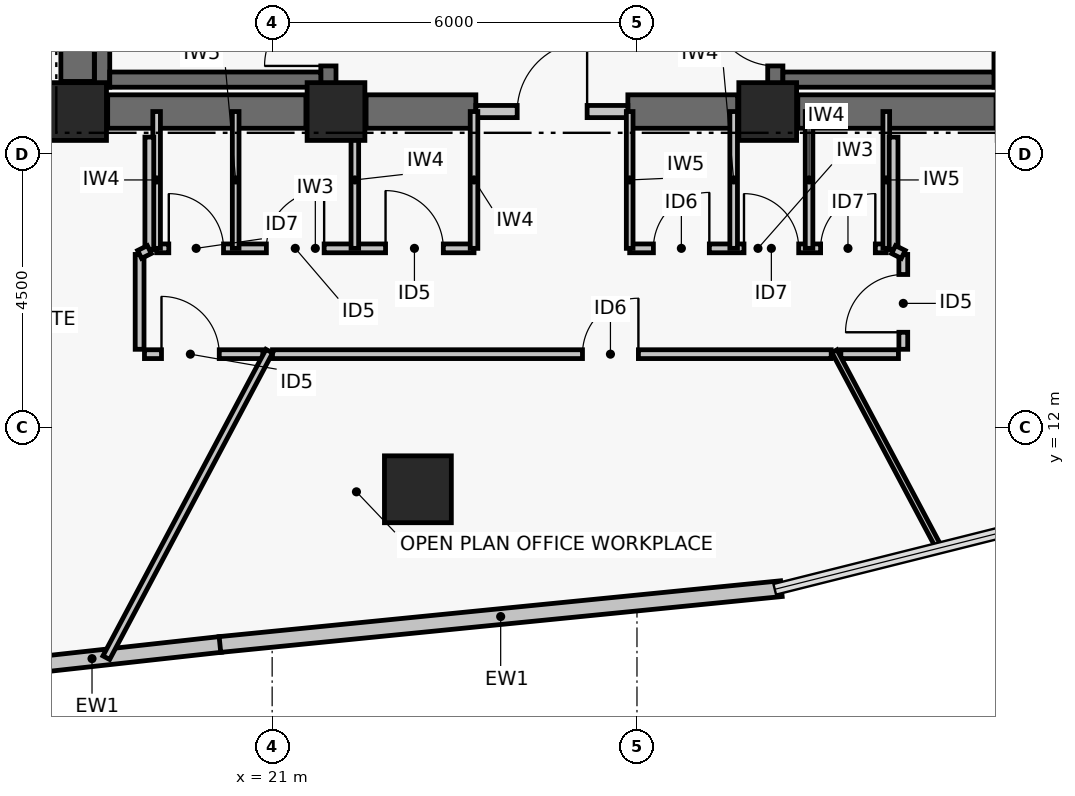
"""IFC4 building model, lengths in metres.
Left out: names, types, materials, properties, quantities, classifications, styles, units other than length and angle.
Written with IfcOpenShell. Run it as: python <this file> out.ifc"""

import sys

from ifc_helpers import new_model, si_unit, direction, frame, frame_2d, origin, origin_2d, place, context, subcontext, project, spatial, rectangle, hollow_rectangle, extrude, element, fill, save


model = new_model("IFC4")
c1 = context("Model", 3, precision=1e-05, world=origin(), true_north=direction((0.0, 1.0)))
c2 = subcontext(c1, "Body", "Model", "MODEL_VIEW")
j1 = project(units=[si_unit("LENGTHUNIT", "METRE"), si_unit("PLANEANGLEUNIT", "RADIAN")], contexts=[c1])
p1 = place(None, origin())
s1 = spatial("IfcSite", under=j1, at=p1, CompositionType="ELEMENT")
p2 = place(p1, origin())
s2 = spatial("IfcBuilding", under=s1, at=p2, CompositionType="ELEMENT")
p3 = place(p2, frame((0.0, 0.0, 165.48)))
s3 = spatial("IfcBuildingStorey", under=s2, at=p3, CompositionType="ELEMENT", Elevation=165.48)
for number, where, z_axis, x_axis in (
    (1, (17.8, 17.2, 0.0), (0.0, 0.0, 1.0), (1.0, 0.0, 0.0)),
    (2, (22.05, 17.2, 0.0), (0.0, 0.0, 1.0), (1.0, 0.0, 0.0)),
    (3, (29.15, 17.2, 0.0), (0.0, 0.0, 1.0), (1.0, 0.0, 0.0)),
):
    element("IfcColumn", number, at=place(p3, frame(where, z_axis=z_axis, x_axis=x_axis)), inside=s3, PredefinedType="COLUMN", context=c2, shape_type="SweptSolid", body=[
        extrude(rectangle(XDim=0.95, YDim=0.95, at=origin_2d()), origin(), (0.0, 0.0, 1.0), 3.72),
    ])
p4 = place(p3, frame((18.295, 17.2, 0.0), z_axis=(0.0, 0.0, 1.0), x_axis=(1.0, 0.0, 0.0)))
e4 = element("IfcWall", 4, at=p4, inside=s3, PredefinedType="SHEAR", context=c2, shape_type="SweptSolid", body=[
    extrude(rectangle(XDim=3.26, YDim=0.55, at=frame_2d((1.63, 0.0))), origin(), (0.0, 0.0, 1.0), 3.5),
])
p5 = place(p3, frame((22.545, 17.2, 0.0), z_axis=(0.0, 0.0, 1.0), x_axis=(1.0, 0.0, 0.0)))
e5 = element("IfcWall", 5, at=p5, inside=s3, PredefinedType="SHEAR", context=c2, shape_type="SweptSolid", body=[
    extrude(rectangle(XDim=1.805, YDim=0.55, at=frame_2d((0.903, 0.0))), origin(), (0.0, 0.0, 1.0), 3.5),
])
p6 = place(p3, frame((26.85, 17.2, 0.0), z_axis=(0.0, 0.0, 1.0), x_axis=(1.0, 0.0, 0.0)))
e6 = element("IfcWall", 6, at=p6, inside=s3, PredefinedType="SHEAR", context=c2, shape_type="SweptSolid", body=[
    extrude(rectangle(XDim=1.805, YDim=0.55, at=frame_2d((0.902, 0.0))), origin(), (0.0, 0.0, 1.0), 3.5),
])
p7 = place(p3, frame((29.645, 17.2, 0.0), z_axis=(0.0, 0.0, 1.0), x_axis=(1.0, 0.0, 0.0)))
e7 = element("IfcWall", 7, at=p7, inside=s3, PredefinedType="SHEAR", context=c2, shape_type="SweptSolid", body=[
    extrude(rectangle(XDim=3.26, YDim=0.55, at=frame_2d((1.63, 0.0))), origin(), (0.0, 0.0, 1.0), 3.5),
])
p8 = place(p3, frame((17.8, 17.695, 0.0), z_axis=(0.0, 0.0, 1.0), x_axis=(0.0, 1.0, 0.0)))
e8 = element("IfcWall", 8, at=p8, inside=s3, PredefinedType="SHEAR", context=c2, shape_type="SweptSolid", body=[
    extrude(rectangle(XDim=8.61, YDim=0.55, at=frame_2d((4.305, 0.0))), origin(), (0.0, 0.0, 1.0), 3.5),
])
p9 = place(p3, frame((18.204, 17.6, 0.0), z_axis=(0.0, 0.0, 1.0), x_axis=(0.0, 1.0, 0.0)))
e9 = element("IfcWall", 9, at=p9, inside=s3, PredefinedType="SHEAR", context=c2, shape_type="SweptSolid", body=[
    extrude(rectangle(XDim=8.8, YDim=0.25, at=frame_2d((4.4, 0.0))), origin(), (0.0, 0.0, 1.0), 3.5),
])
p10 = place(p3, frame((21.925, 17.6, 0.0), z_axis=(0.0, 0.0, 1.0), x_axis=(0.0, 1.0, 0.0)))
e10 = element("IfcWall", 10, at=p10, inside=s3, PredefinedType="SHEAR", context=c2, shape_type="SweptSolid", body=[
    extrude(rectangle(XDim=8.8, YDim=0.25, at=frame_2d((4.4, 0.0))), origin(), (0.0, 0.0, 1.0), 3.5),
])
p11 = place(p10, frame((0.35, 0.0, 0.0)))
e11 = element("IfcOpeningElement", 11, at=p11, cuts=e10, PredefinedType="OPENING", context=c2, shape_type="SweptSolid", body=[
    extrude(rectangle(XDim=1.05, YDim=2.08, at=frame_2d((0.525, 1.04))), frame((0.0, 0.135, 0.0), z_axis=(0.0, -1.0, 0.0), x_axis=(1.0, 0.0, 0.0)), (0.0, 0.0, 1.0), 0.27),
])
p12 = place(p3, frame((18.329, 17.725, 0.0), z_axis=(0.0, 0.0, 1.0), x_axis=(1.0, 0.0, 0.0)))
e12 = element("IfcWall", 12, at=p12, inside=s3, PredefinedType="SHEAR", context=c2, shape_type="SweptSolid", body=[
    extrude(rectangle(XDim=3.471, YDim=0.25, at=frame_2d((1.735, 0.0))), origin(), (0.0, 0.0, 1.0), 3.5),
])
p13 = place(p3, frame((29.275, 17.6, 0.0), z_axis=(0.0, 0.0, 1.0), x_axis=(0.0, 1.0, 0.0)))
e13 = element("IfcWall", 13, at=p13, inside=s3, PredefinedType="SHEAR", context=c2, shape_type="SweptSolid", body=[
    extrude(rectangle(XDim=8.8, YDim=0.25, at=frame_2d((4.4, 0.0))), origin(), (0.0, 0.0, 1.0), 3.5),
])
p14 = place(p13, frame((0.35, 0.0, 0.0)))
e14 = element("IfcOpeningElement", 14, at=p14, cuts=e13, PredefinedType="OPENING", context=c2, shape_type="SweptSolid", body=[
    extrude(rectangle(XDim=1.05, YDim=2.08, at=frame_2d((0.525, 1.04))), frame((0.0, 0.135, 0.0), z_axis=(0.0, -1.0, 0.0), x_axis=(1.0, 0.0, 0.0)), (0.0, 0.0, 1.0), 0.27),
])
p15 = place(p3, frame((32.996, 17.6, 0.0), z_axis=(0.0, 0.0, 1.0), x_axis=(0.0, 1.0, 0.0)))
e15 = element("IfcWall", 15, at=p15, inside=s3, PredefinedType="SHEAR", context=c2, shape_type="SweptSolid", body=[
    extrude(rectangle(XDim=8.8, YDim=0.25, at=frame_2d((4.4, 0.0))), origin(), (0.0, 0.0, 1.0), 3.5),
])
p16 = place(p3, frame((29.4, 17.725, 0.0), z_axis=(0.0, 0.0, 1.0), x_axis=(1.0, 0.0, 0.0)))
e16 = element("IfcWall", 16, at=p16, inside=s3, PredefinedType="SHEAR", context=c2, shape_type="SweptSolid", body=[
    extrude(rectangle(XDim=3.471, YDim=0.25, at=frame_2d((1.736, 0.0))), origin(), (0.0, 0.0, 1.0), 3.5),
])
p17 = place(p3, frame((23.397, 10.988, 0.0), z_axis=(0.0, 0.0, 1.0), x_axis=(1.0, 0.0, 0.0)))
e17 = element("IfcColumn", 17, at=p17, inside=s3, PredefinedType="COLUMN", context=c2, shape_type="SweptSolid", body=[
    extrude(hollow_rectangle(XDim=1.1, YDim=1.1, WallThickness=0.045, at=origin_2d()), origin(), (0.0, 0.0, 1.0), 3.72),
])
p18 = place(p3, frame((20.153, 8.437, 0.0), z_axis=(0.0, 0.0, 1.0), x_axis=(-0.993933978819, -0.109978387641, 0.0)))
e18 = element("IfcWall", 18, at=p18, inside=s3, PredefinedType="PARTITIONING", context=c2, shape_type="SweptSolid", body=[
    extrude(rectangle(XDim=4.258, YDim=0.26, at=frame_2d((2.129, 0.0))), origin(), (0.0, 0.0, 1.0), 3.5),
])
p19 = place(p3, frame((29.375, 9.354, 0.0), z_axis=(0.0, 0.0, 1.0), x_axis=(-0.9950896707, -0.098977508888, 0.0)))
e19 = element("IfcWall", 19, at=p19, inside=s3, PredefinedType="PARTITIONING", context=c2, shape_type="SweptSolid", body=[
    extrude(rectangle(XDim=9.28, YDim=0.26, at=frame_2d((4.64, 0.0))), origin(), (0.0, 0.0, 1.0), 3.5),
])
p20 = place(p3, frame((24.35, 17.2, 0.0), z_axis=(0.0, 0.0, 1.0), x_axis=(1.0, 0.0, 0.0)))
e20 = element("IfcWall", 20, at=p20, inside=s3, PredefinedType="PARTITIONING", context=c2, shape_type="SweptSolid", body=[
    extrude(rectangle(XDim=2.5, YDim=0.2, at=frame_2d((1.25, 0.0))), origin(), (0.0, 0.0, 1.0), 2.63),
])
p21 = place(p20, frame((0.68, 0.0, 0.0)))
e21 = element("IfcOpeningElement", 21, at=p21, cuts=e20, PredefinedType="OPENING", context=c2, shape_type="SweptSolid", body=[
    extrude(rectangle(XDim=1.15, YDim=2.08, at=frame_2d((0.575, 1.04))), frame((0.0, 0.11, 0.0), z_axis=(0.0, -1.0, 0.0), x_axis=(1.0, 0.0, 0.0)), (0.0, 0.0, 1.0), 0.22),
])
p22 = place(p3, frame((19.1, 14.95, 0.0), z_axis=(0.0, 0.0, 1.0), x_axis=(1.0, 0.0, 0.0)))
e22 = element("IfcWall", 22, at=p22, inside=s3, PredefinedType="PARTITIONING", context=c2, shape_type="SweptSolid", body=[
    extrude(rectangle(XDim=5.22, YDim=0.145, at=frame_2d((2.61, 0.0))), origin(), (0.0, 0.0, 1.0), 2.73),
])
p23 = place(p22, frame((0.2, 0.0, 0.0)))
e23 = element("IfcOpeningElement", 23, at=p23, cuts=e22, PredefinedType="OPENING", context=c2, shape_type="SweptSolid", body=[
    extrude(rectangle(XDim=0.9, YDim=2.02, at=frame_2d((0.45, 1.01))), frame((0.0, 0.083, 0.0), z_axis=(0.0, -1.0, 0.0), x_axis=(1.0, 0.0, 0.0)), (0.0, 0.0, 1.0), 0.165),
])
p24 = place(p22, frame((1.805, 0.0, 0.0)))
e24 = element("IfcOpeningElement", 24, at=p24, cuts=e22, PredefinedType="OPENING", context=c2, shape_type="SweptSolid", body=[
    extrude(rectangle(XDim=0.95, YDim=2.06, at=frame_2d((0.475, 1.03))), frame((0.0, 0.083, 0.0), z_axis=(0.0, -1.0, 0.0), x_axis=(1.0, 0.0, 0.0)), (0.0, 0.0, 1.0), 0.165),
])
p25 = place(p22, frame((3.765, 0.0, 0.0)))
e25 = element("IfcOpeningElement", 25, at=p25, cuts=e22, PredefinedType="OPENING", context=c2, shape_type="SweptSolid", body=[
    extrude(rectangle(XDim=0.95, YDim=2.06, at=frame_2d((0.475, 1.03))), frame((0.0, 0.083, 0.0), z_axis=(0.0, -1.0, 0.0), x_axis=(1.0, 0.0, 0.0)), (0.0, 0.0, 1.0), 0.165),
])
p26 = place(p3, frame((26.88, 14.95, 0.0), z_axis=(0.0, 0.0, 1.0), x_axis=(1.0, 0.0, 0.0)))
e26 = element("IfcWall", 26, at=p26, inside=s3, PredefinedType="PARTITIONING", context=c2, shape_type="SweptSolid", body=[
    extrude(rectangle(XDim=4.22, YDim=0.145, at=frame_2d((2.11, 0.0))), origin(), (0.0, 0.0, 1.0), 2.93),
])
p27 = place(p26, frame((0.39, 0.0, 0.0)))
e27 = element("IfcOpeningElement", 27, at=p27, cuts=e26, PredefinedType="OPENING", context=c2, shape_type="SweptSolid", body=[
    extrude(rectangle(XDim=0.92, YDim=2.05, at=frame_2d((0.46, 1.025))), frame((0.0, 0.083, 0.0), z_axis=(0.0, -1.0, 0.0), x_axis=(1.0, 0.0, 0.0)), (0.0, 0.0, 1.0), 0.165),
])
p28 = place(p26, frame((1.88, 0.0, 0.0)))
e28 = element("IfcOpeningElement", 28, at=p28, cuts=e26, PredefinedType="OPENING", context=c2, shape_type="SweptSolid", body=[
    extrude(rectangle(XDim=0.9, YDim=2.02, at=frame_2d((0.45, 1.01))), frame((0.0, 0.083, 0.0), z_axis=(0.0, -1.0, 0.0), x_axis=(1.0, 0.0, 0.0)), (0.0, 0.0, 1.0), 0.165),
])
p29 = place(p26, frame((3.14, 0.0, 0.0)))
e29 = element("IfcOpeningElement", 29, at=p29, cuts=e26, PredefinedType="OPENING", context=c2, shape_type="SweptSolid", body=[
    extrude(rectangle(XDim=0.9, YDim=2.02, at=frame_2d((0.45, 1.01))), frame((0.0, 0.083, 0.0), z_axis=(0.0, -1.0, 0.0), x_axis=(1.0, 0.0, 0.0)), (0.0, 0.0, 1.0), 0.165),
])
p30 = place(p3, frame((19.1, 14.95, 0.0), z_axis=(0.0, 0.0, 1.0), x_axis=(0.0, 1.0, 0.0)))
e30 = element("IfcWall", 30, at=p30, inside=s3, PredefinedType="PARTITIONING", context=c2, shape_type="SweptSolid", body=[
    extrude(rectangle(XDim=2.25, YDim=0.125, at=frame_2d((1.125, 0.0))), origin(), (0.0, 0.0, 1.0), 2.63),
])
p31 = place(p3, frame((20.4, 14.95, 0.0), z_axis=(0.0, 0.0, 1.0), x_axis=(0.0, 1.0, 0.0)))
e31 = element("IfcWall", 31, at=p31, inside=s3, PredefinedType="PARTITIONING", context=c2, shape_type="SweptSolid", body=[
    extrude(rectangle(XDim=2.25, YDim=0.11, at=frame_2d((1.125, 0.0))), origin(), (0.0, 0.0, 1.0), 2.63),
])
for number, where, z_axis, x_axis in (
    (32, (22.36, 14.95, 0.0), (0.0, 0.0, 1.0), (0.0, 1.0, 0.0)),
    (33, (24.32, 14.95, 0.0), (0.0, 0.0, 1.0), (0.0, 1.0, 0.0)),
):
    element("IfcWall", number, at=place(p3, frame(where, z_axis=z_axis, x_axis=x_axis)), inside=s3, PredefinedType="PARTITIONING", context=c2, shape_type="SweptSolid", body=[
        extrude(rectangle(XDim=2.25, YDim=0.125, at=frame_2d((1.125, 0.0))), origin(), (0.0, 0.0, 1.0), 2.63),
    ])
p32 = place(p3, frame((26.88, 14.95, 0.0), z_axis=(0.0, 0.0, 1.0), x_axis=(0.0, 1.0, 0.0)))
e34 = element("IfcWall", 34, at=p32, inside=s3, PredefinedType="PARTITIONING", context=c2, shape_type="SweptSolid", body=[
    extrude(rectangle(XDim=2.25, YDim=0.11, at=frame_2d((1.125, 0.0))), origin(), (0.0, 0.0, 1.0), 2.63),
])
for number, where, z_axis, x_axis in (
    (35, (28.59, 14.95, 0.0), (0.0, 0.0, 1.0), (0.0, 1.0, 0.0)),
    (36, (29.83, 14.95, 0.0), (0.0, 0.0, 1.0), (0.0, 1.0, 0.0)),
):
    element("IfcWall", number, at=place(p3, frame(where, z_axis=z_axis, x_axis=x_axis)), inside=s3, PredefinedType="PARTITIONING", context=c2, shape_type="SweptSolid", body=[
        extrude(rectangle(XDim=2.25, YDim=0.125, at=frame_2d((1.125, 0.0))), origin(), (0.0, 0.0, 1.0), 2.63),
    ])
p33 = place(p3, frame((31.1, 14.95, 0.0), z_axis=(0.0, 0.0, 1.0), x_axis=(0.0, 1.0, 0.0)))
e37 = element("IfcWall", 37, at=p33, inside=s3, PredefinedType="PARTITIONING", context=c2, shape_type="SweptSolid", body=[
    extrude(rectangle(XDim=2.25, YDim=0.11, at=frame_2d((1.125, 0.0))), origin(), (0.0, 0.0, 1.0), 2.63),
])
p34 = place(p3, frame((18.98, 16.78, 0.0), z_axis=(0.0, 0.0, 1.0), x_axis=(0.0, -1.0, 0.0)))
e38 = element("IfcWall", 38, at=p34, inside=s3, PredefinedType="PARTITIONING", context=c2, shape_type="SweptSolid", body=[
    extrude(rectangle(XDim=1.85, YDim=0.145, at=frame_2d((0.925, 0.0))), origin(), (0.0, 0.0, 1.0), 2.63),
])
p35 = place(p3, frame((18.82, 14.85, 0.0), z_axis=(0.0, 0.0, 1.0), x_axis=(0.0, -1.0, 0.0)))
e39 = element("IfcWall", 39, at=p35, inside=s3, PredefinedType="PARTITIONING", context=c2, shape_type="SweptSolid", body=[
    extrude(rectangle(XDim=1.56, YDim=0.145, at=frame_2d((0.78, 0.0))), origin(), (0.0, 0.0, 1.0), 3.08),
])
p36 = place(p3, frame((18.9, 13.21, 0.0), z_axis=(0.0, 0.0, 1.0), x_axis=(1.0, 0.0, 0.0)))
e40 = element("IfcWall", 40, at=p36, inside=s3, PredefinedType="PARTITIONING", context=c2, shape_type="SweptSolid", body=[
    extrude(rectangle(XDim=1.947, YDim=0.145, at=frame_2d((0.974, 0.0))), origin(), (0.0, 0.0, 1.0), 3.08),
])
p37 = place(p36, frame((0.28, 0.0, 0.0)))
e41 = element("IfcOpeningElement", 41, at=p37, cuts=e40, PredefinedType="OPENING", context=c2, shape_type="SweptSolid", body=[
    extrude(rectangle(XDim=0.95, YDim=2.06, at=frame_2d((0.475, 1.03))), frame((0.0, 0.083, 0.0), z_axis=(0.0, -1.0, 0.0), x_axis=(1.0, 0.0, 0.0)), (0.0, 0.0, 1.0), 0.165),
])
p38 = place(p3, frame((21.006, 13.21, 0.0), z_axis=(0.0, 0.0, 1.0), x_axis=(1.0, 0.0, 0.0)))
e42 = element("IfcWall", 42, at=p38, inside=s3, PredefinedType="PARTITIONING", context=c2, shape_type="SweptSolid", body=[
    extrude(rectangle(XDim=9.189, YDim=0.145, at=frame_2d((4.594, 0.0))), origin(), (0.0, 0.0, 1.0), 2.73),
])
p39 = place(p38, frame((5.098, 0.0, 0.0)))
e43 = element("IfcOpeningElement", 43, at=p39, cuts=e42, PredefinedType="OPENING", context=c2, shape_type="SweptSolid", body=[
    extrude(rectangle(XDim=0.92, YDim=2.05, at=frame_2d((0.46, 1.025))), frame((0.0, 0.083, 0.0), z_axis=(0.0, -1.0, 0.0), x_axis=(1.0, 0.0, 0.0)), (0.0, 0.0, 1.0), 0.165),
])
p40 = place(p3, frame((30.353, 13.21, 0.0), z_axis=(0.0, 0.0, 1.0), x_axis=(1.0, 0.0, 0.0)))
e44 = element("IfcWall", 44, at=p40, inside=s3, PredefinedType="PARTITIONING", context=c2, shape_type="SweptSolid", body=[
    extrude(rectangle(XDim=0.947, YDim=0.145, at=frame_2d((0.474, 0.0))), origin(), (0.0, 0.0, 1.0), 3.5),
])
p41 = place(p3, frame((31.38, 13.29, 0.0), z_axis=(0.0, 0.0, 1.0), x_axis=(0.0, 1.0, 0.0)))
e45 = element("IfcWall", 45, at=p41, inside=s3, PredefinedType="PARTITIONING", context=c2, shape_type="SweptSolid", body=[
    extrude(rectangle(XDim=1.56, YDim=0.145, at=frame_2d((0.78, 0.0))), origin(), (0.0, 0.0, 1.0), 3.5),
])
p42 = place(p41, frame((0.28, 0.0, 0.0)))
e46 = element("IfcOpeningElement", 46, at=p42, cuts=e45, PredefinedType="OPENING", context=c2, shape_type="SweptSolid", body=[
    extrude(rectangle(XDim=0.95, YDim=2.06, at=frame_2d((0.475, 1.03))), frame((0.0, 0.083, 0.0), z_axis=(0.0, -1.0, 0.0), x_axis=(1.0, 0.0, 0.0)), (0.0, 0.0, 1.0), 0.165),
])
p43 = place(p3, frame((31.22, 14.93, 0.0), z_axis=(0.0, 0.0, 1.0), x_axis=(0.0, 1.0, 0.0)))
e47 = element("IfcWall", 47, at=p43, inside=s3, PredefinedType="PARTITIONING", context=c2, shape_type="SweptSolid", body=[
    extrude(rectangle(XDim=1.85, YDim=0.145, at=frame_2d((0.925, 0.0))), origin(), (0.0, 0.0, 1.0), 2.63),
])
p44 = place(p3, frame((20.953, 13.26, 0.0), z_axis=(0.0, 0.0, 1.0), x_axis=(-0.469478237377, -0.882944043883, 0.0)))
e48 = element("IfcWall", 48, at=p44, inside=s3, PredefinedType="PARTITIONING", context=c2, shape_type="SweptSolid", body=[
    extrude(rectangle(XDim=5.71, YDim=0.125, at=frame_2d((2.855, 0.0))), origin(), (0.0, 0.0, 1.0), 2.93),
])
p45 = place(p3, frame((30.247, 13.26, 0.0), z_axis=(0.0, 0.0, 1.0), x_axis=(0.469475406562, -0.882945549076, 0.0)))
e49 = element("IfcWall", 49, at=p45, inside=s3, PredefinedType="PARTITIONING", context=c2, shape_type="SweptSolid", body=[
    extrude(rectangle(XDim=3.679, YDim=0.095, at=frame_2d((1.84, 0.0))), origin(), (0.0, 0.0, 1.0), 3.5),
])
for number, where, z_axis, x_axis in (
    (50, (18.82, 14.85, 0.0), (0.0, 0.0, 1.0), (0.895, 0.447, 0.0)),
    (51, (31.38, 14.85, 0.0), (0.0, 0.0, 1.0), (-0.895, 0.447, 0.0)),
):
    element("IfcWall", number, at=place(p3, frame(where, z_axis=z_axis, x_axis=x_axis)), inside=s3, PredefinedType="PARTITIONING", context=c2, shape_type="SweptSolid", body=[
        extrude(rectangle(XDim=0.179, YDim=0.145, at=frame_2d((0.089, 0.0))), origin(), (0.0, 0.0, 1.0), 3.5),
    ])
p46 = place(p11, origin())
e52 = element("IfcDoor", 52, at=p46, inside=s3, OperationType="SINGLE_SWING_LEFT", PredefinedType="DOOR", context=c2, shape_type="SweptSolid", body=[
    extrude(rectangle(XDim=1.05, YDim=2.08, at=frame_2d((0.525, 1.04))), frame((0.0, 0.025, 0.0), z_axis=(0.0, -1.0, 0.0), x_axis=(1.0, 0.0, 0.0)), (0.0, 0.0, 1.0), 0.05),
])
fill(e11, e52)
p47 = place(p14, origin())
e53 = element("IfcDoor", 53, at=p47, inside=s3, OperationType="SINGLE_SWING_RIGHT", PredefinedType="DOOR", context=c2, shape_type="SweptSolid", body=[
    extrude(rectangle(XDim=1.05, YDim=2.08, at=frame_2d((0.525, 1.04))), frame((0.0, 0.025, 0.0), z_axis=(0.0, -1.0, 0.0), x_axis=(1.0, 0.0, 0.0)), (0.0, 0.0, 1.0), 0.05),
])
fill(e14, e53)
p48 = place(p21, origin())
e54 = element("IfcDoor", 54, at=p48, inside=s3, OperationType="SINGLE_SWING_RIGHT", PredefinedType="DOOR", context=c2, shape_type="SweptSolid", body=[
    extrude(rectangle(XDim=1.15, YDim=2.08, at=frame_2d((0.575, 1.04))), frame((0.0, 0.025, 0.0), z_axis=(0.0, -1.0, 0.0), x_axis=(1.0, 0.0, 0.0)), (0.0, 0.0, 1.0), 0.05),
])
fill(e21, e54)
p49 = place(p23, origin())
e55 = element("IfcDoor", 55, at=p49, inside=s3, OperationType="SINGLE_SWING_LEFT", PredefinedType="DOOR", context=c2, shape_type="SweptSolid", body=[
    extrude(rectangle(XDim=0.9, YDim=2.02, at=frame_2d((0.45, 1.01))), frame((0.0, 0.025, 0.0), z_axis=(0.0, -1.0, 0.0), x_axis=(1.0, 0.0, 0.0)), (0.0, 0.0, 1.0), 0.05),
])
fill(e23, e55)
p50 = place(p24, origin())
e56 = element("IfcDoor", 56, at=p50, inside=s3, OperationType="SINGLE_SWING_RIGHT", PredefinedType="DOOR", context=c2, shape_type="SweptSolid", body=[
    extrude(rectangle(XDim=0.95, YDim=2.06, at=frame_2d((0.475, 1.03))), frame((0.0, 0.025, 0.0), z_axis=(0.0, -1.0, 0.0), x_axis=(1.0, 0.0, 0.0)), (0.0, 0.0, 1.0), 0.05),
])
fill(e24, e56)
p51 = place(p25, origin())
e57 = element("IfcDoor", 57, at=p51, inside=s3, OperationType="SINGLE_SWING_LEFT", PredefinedType="DOOR", context=c2, shape_type="SweptSolid", body=[
    extrude(rectangle(XDim=0.95, YDim=2.06, at=frame_2d((0.475, 1.03))), frame((0.0, 0.025, 0.0), z_axis=(0.0, -1.0, 0.0), x_axis=(1.0, 0.0, 0.0)), (0.0, 0.0, 1.0), 0.05),
])
fill(e25, e57)
p52 = place(p27, origin())
e58 = element("IfcDoor", 58, at=p52, inside=s3, OperationType="SINGLE_SWING_RIGHT", PredefinedType="DOOR", context=c2, shape_type="SweptSolid", body=[
    extrude(rectangle(XDim=0.92, YDim=2.05, at=frame_2d((0.46, 1.025))), frame((0.0, 0.025, 0.0), z_axis=(0.0, -1.0, 0.0), x_axis=(1.0, 0.0, 0.0)), (0.0, 0.0, 1.0), 0.05),
])
fill(e27, e58)
p53 = place(p28, origin())
e59 = element("IfcDoor", 59, at=p53, inside=s3, OperationType="SINGLE_SWING_LEFT", PredefinedType="DOOR", context=c2, shape_type="SweptSolid", body=[
    extrude(rectangle(XDim=0.9, YDim=2.02, at=frame_2d((0.45, 1.01))), frame((0.0, 0.025, 0.0), z_axis=(0.0, -1.0, 0.0), x_axis=(1.0, 0.0, 0.0)), (0.0, 0.0, 1.0), 0.05),
])
fill(e28, e59)
p54 = place(p29, origin())
e60 = element("IfcDoor", 60, at=p54, inside=s3, OperationType="SINGLE_SWING_RIGHT", PredefinedType="DOOR", context=c2, shape_type="SweptSolid", body=[
    extrude(rectangle(XDim=0.9, YDim=2.02, at=frame_2d((0.45, 1.01))), frame((0.0, 0.025, 0.0), z_axis=(0.0, -1.0, 0.0), x_axis=(1.0, 0.0, 0.0)), (0.0, 0.0, 1.0), 0.05),
])
fill(e29, e60)
p55 = place(p37, origin())
e61 = element("IfcDoor", 61, at=p55, inside=s3, OperationType="SINGLE_SWING_LEFT", PredefinedType="DOOR", context=c2, shape_type="SweptSolid", body=[
    extrude(rectangle(XDim=0.95, YDim=2.06, at=frame_2d((0.475, 1.03))), frame((0.0, 0.025, 0.0), z_axis=(0.0, -1.0, 0.0), x_axis=(1.0, 0.0, 0.0)), (0.0, 0.0, 1.0), 0.05),
])
fill(e41, e61)
p56 = place(p39, origin())
e62 = element("IfcDoor", 62, at=p56, inside=s3, OperationType="SINGLE_SWING_RIGHT", PredefinedType="DOOR", context=c2, shape_type="SweptSolid", body=[
    extrude(rectangle(XDim=0.92, YDim=2.05, at=frame_2d((0.46, 1.025))), frame((0.0, 0.025, 0.0), z_axis=(0.0, -1.0, 0.0), x_axis=(1.0, 0.0, 0.0)), (0.0, 0.0, 1.0), 0.05),
])
fill(e43, e62)
p57 = place(p42, origin())
e63 = element("IfcDoor", 63, at=p57, inside=s3, OperationType="SINGLE_SWING_LEFT", PredefinedType="DOOR", context=c2, shape_type="SweptSolid", body=[
    extrude(rectangle(XDim=0.95, YDim=2.06, at=frame_2d((0.475, 1.03))), frame((0.0, 0.025, 0.0), z_axis=(0.0, -1.0, 0.0), x_axis=(1.0, 0.0, 0.0)), (0.0, 0.0, 1.0), 0.05),
])
fill(e46, e63)
save(model, sys.argv[1])
